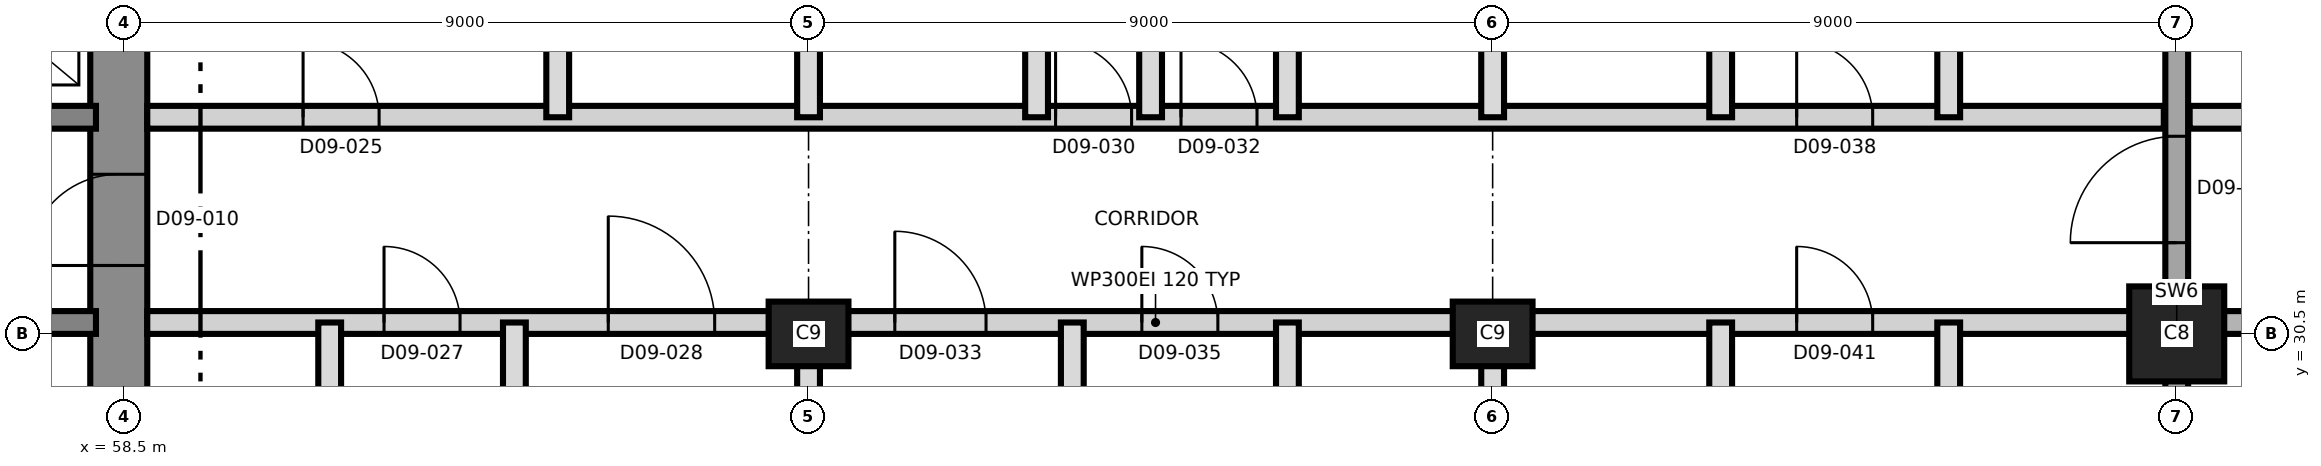
"""IFC4 building model, lengths in metres.
Left out: names, types, materials, properties, quantities, classifications, styles, units other than length and angle.
Written with IfcOpenShell. Run it as: python <this file> out.ifc"""

import sys

from ifc_helpers import new_model, si_unit, direction, frame, frame_2d, origin, origin_2d, place, context, subcontext, project, spatial, rectangle, extrude, element, fill, save


model = new_model("IFC4")
c1 = context("Model", 3, precision=1e-05, world=origin(), true_north=direction((0.0, 1.0)))
c2 = subcontext(c1, "Body", "Model", "MODEL_VIEW")
j1 = project(units=[si_unit("LENGTHUNIT", "METRE"), si_unit("PLANEANGLEUNIT", "RADIAN")], contexts=[c1])
p1 = place(None, origin())
s1 = spatial("IfcSite", under=j1, at=p1, CompositionType="ELEMENT")
p2 = place(p1, origin())
s2 = spatial("IfcBuilding", under=s1, at=p2, CompositionType="ELEMENT")
p3 = place(p2, frame((0.0, 0.0, 109.3)))
s3 = spatial("IfcBuildingStorey", under=s2, at=p3, CompositionType="ELEMENT", Elevation=109.3)
p4 = place(p3, frame((58.425, 21.125, 0.0), z_axis=(0.0, 0.0, 1.0), x_axis=(0.0, 1.0, 0.0)))
e1 = element("IfcWall", 1, at=p4, inside=s3, PredefinedType="SHEAR", context=c2, shape_type="SweptSolid", body=[
    extrude(rectangle(XDim=18.75, YDim=0.75, at=frame_2d((9.375, 0.0))), origin(), (0.0, 0.0, 1.0), 3.7),
])
p5 = place(p4, frame((10.275, 0.0, 0.0)))
e2 = element("IfcOpeningElement", 2, at=p5, cuts=e1, PredefinedType="OPENING", context=c2, shape_type="SweptSolid", body=[
    extrude(rectangle(XDim=1.2, YDim=2.1, at=frame_2d((0.6, 1.05))), frame((0.0, 0.385, 0.0), z_axis=(0.0, -1.0, 0.0), x_axis=(1.0, 0.0, 0.0)), (0.0, 0.0, 1.0), 0.77),
])
p6 = place(p3, frame((31.875, 30.65, 0.0), z_axis=(0.0, 0.0, 1.0), x_axis=(1.0, 0.0, 0.0)))
e3 = element("IfcWall", 3, at=p6, inside=s3, PredefinedType="SHEAR", context=c2, shape_type="SweptSolid", body=[
    extrude(rectangle(XDim=26.25, YDim=0.3, at=frame_2d((13.125, 0.0))), origin(), (0.0, 0.0, 1.0), 3.7),
])
p7 = place(p6, frame((24.625, 0.0, 0.0)))
e4 = element("IfcOpeningElement", 4, at=p7, cuts=e3, PredefinedType="OPENING", context=c2, shape_type="SweptSolid", body=[
    extrude(rectangle(XDim=1.0, YDim=2.1, at=frame_2d((0.5, 1.05))), frame((0.0, 0.16, 0.0), z_axis=(0.0, -1.0, 0.0), x_axis=(1.0, 0.0, 0.0)), (0.0, 0.0, 1.0), 0.32),
])
p8 = place(p6, frame((11.425, 0.0, 0.0)))
e5 = element("IfcOpeningElement", 5, at=p8, cuts=e3, PredefinedType="OPENING", context=c2, shape_type="SweptSolid", body=[
    extrude(rectangle(XDim=1.0, YDim=2.1, at=frame_2d((0.5, 1.05))), frame((0.0, 0.16, 0.0), z_axis=(0.0, -1.0, 0.0), x_axis=(1.0, 0.0, 0.0)), (0.0, 0.0, 1.0), 0.32),
])
p9 = place(p3, frame((31.875, 33.35, 0.0), z_axis=(0.0, 0.0, 1.0), x_axis=(1.0, 0.0, 0.0)))
e6 = element("IfcWall", 6, at=p9, inside=s3, PredefinedType="SHEAR", context=c2, shape_type="SweptSolid", body=[
    extrude(rectangle(XDim=26.25, YDim=0.3, at=frame_2d((13.125, 0.0))), origin(), (0.0, 0.0, 1.0), 3.7),
])
p10 = place(p9, frame((13.775, 0.0, 0.0)))
e7 = element("IfcOpeningElement", 7, at=p10, cuts=e6, PredefinedType="OPENING", context=c2, shape_type="SweptSolid", body=[
    extrude(rectangle(XDim=1.4, YDim=2.1, at=frame_2d((0.7, 1.05))), frame((0.0, 0.16, 0.0), z_axis=(0.0, -1.0, 0.0), x_axis=(1.0, 0.0, 0.0)), (0.0, 0.0, 1.0), 0.32),
])
p11 = place(p9, frame((5.25, 0.0, 0.0)))
e8 = element("IfcOpeningElement", 8, at=p11, cuts=e6, PredefinedType="OPENING", context=c2, shape_type="SweptSolid", body=[
    extrude(rectangle(XDim=1.2, YDim=2.1, at=frame_2d((0.6, 1.05))), frame((0.0, 0.16, 0.0), z_axis=(0.0, -1.0, 0.0), x_axis=(1.0, 0.0, 0.0)), (0.0, 0.0, 1.0), 0.32),
])
p12 = place(p9, frame((19.8, 0.0, 0.0)))
e9 = element("IfcOpeningElement", 9, at=p12, cuts=e6, PredefinedType="OPENING", context=c2, shape_type="SweptSolid", body=[
    extrude(rectangle(XDim=1.2, YDim=2.1, at=frame_2d((0.6, 1.05))), frame((0.0, 0.16, 0.0), z_axis=(0.0, -1.0, 0.0), x_axis=(1.0, 0.0, 0.0)), (0.0, 0.0, 1.0), 0.32),
])
for number, where, z_axis, x_axis in (
    (10, (67.5, 30.5, 0.0), (0.0, 0.0, 1.0), (1.0, 0.0, 0.0)),
    (11, (76.5, 30.5, 0.0), (0.0, 0.0, 1.0), (1.0, 0.0, 0.0)),
):
    element("IfcColumn", number, at=place(p3, frame(where, z_axis=z_axis, x_axis=x_axis)), inside=s3, PredefinedType="COLUMN", context=c2, shape_type="SweptSolid", body=[
        extrude(rectangle(XDim=1.05, YDim=0.85, at=origin_2d()), origin(), (0.0, 0.0, 1.0), 3.7),
    ])
p13 = place(p3, frame((85.5, 30.5, 0.0), z_axis=(0.0, 0.0, 1.0), x_axis=(1.0, 0.0, 0.0)))
e12 = element("IfcColumn", 12, at=p13, inside=s3, PredefinedType="COLUMN", context=c2, shape_type="SweptSolid", body=[
    extrude(rectangle(XDim=1.25, YDim=1.25, at=origin_2d()), origin(), (0.0, 0.0, 1.0), 3.7),
])
p14 = place(p3, frame((85.5, 20.35, 0.0), z_axis=(0.0, 0.0, 1.0), x_axis=(0.0, 1.0, 0.0)))
e13 = element("IfcWall", 13, at=p14, inside=s3, PredefinedType="SHEAR", context=c2, shape_type="SweptSolid", body=[
    extrude(rectangle(XDim=20.3, YDim=0.3, at=frame_2d((10.15, 0.0))), origin(), (0.0, 0.0, 1.0), 3.7),
])
p15 = place(p14, frame((11.35, 0.0, 0.0)))
e14 = element("IfcOpeningElement", 14, at=p15, cuts=e13, PredefinedType="OPENING", context=c2, shape_type="SweptSolid", body=[
    extrude(rectangle(XDim=1.4, YDim=2.1, at=frame_2d((0.7, 1.05))), frame((0.0, 0.16, 0.0), z_axis=(0.0, -1.0, 0.0), x_axis=(1.0, 0.0, 0.0)), (0.0, 0.0, 1.0), 0.32),
])
p16 = place(p3, frame((58.8, 30.65, 0.0), z_axis=(0.0, 0.0, 1.0), x_axis=(1.0, 0.0, 0.0)))
e15 = element("IfcWall", 15, at=p16, inside=s3, PredefinedType="PARTITIONING", context=c2, shape_type="SweptSolid", body=[
    extrude(rectangle(XDim=26.53, YDim=0.3, at=frame_2d((13.265, 0.0))), origin(), (0.0, 0.0, 1.0), 3.4),
])
p17 = place(p16, frame((3.115, 0.0, 0.0)))
e16 = element("IfcOpeningElement", 16, at=p17, cuts=e15, PredefinedType="OPENING", context=c2, shape_type="SweptSolid", body=[
    extrude(rectangle(XDim=1.0, YDim=2.1, at=frame_2d((0.5, 1.05))), frame((0.0, 0.16, 0.0), z_axis=(0.0, -1.0, 0.0), x_axis=(1.0, 0.0, 0.0)), (0.0, 0.0, 1.0), 0.32),
])
p18 = place(p16, frame((6.065, 0.0, 0.0)))
e17 = element("IfcOpeningElement", 17, at=p18, cuts=e15, PredefinedType="OPENING", context=c2, shape_type="SweptSolid", body=[
    extrude(rectangle(XDim=1.4, YDim=2.1, at=frame_2d((0.7, 1.05))), frame((0.0, 0.16, 0.0), z_axis=(0.0, -1.0, 0.0), x_axis=(1.0, 0.0, 0.0)), (0.0, 0.0, 1.0), 0.32),
])
p19 = place(p16, frame((9.835, 0.0, 0.0)))
e18 = element("IfcOpeningElement", 18, at=p19, cuts=e15, PredefinedType="OPENING", context=c2, shape_type="SweptSolid", body=[
    extrude(rectangle(XDim=1.2, YDim=2.1, at=frame_2d((0.6, 1.05))), frame((0.0, 0.16, 0.0), z_axis=(0.0, -1.0, 0.0), x_axis=(1.0, 0.0, 0.0)), (0.0, 0.0, 1.0), 0.32),
])
p20 = place(p16, frame((13.085, 0.0, 0.0)))
e19 = element("IfcOpeningElement", 19, at=p20, cuts=e15, PredefinedType="OPENING", context=c2, shape_type="SweptSolid", body=[
    extrude(rectangle(XDim=1.0, YDim=2.1, at=frame_2d((0.5, 1.05))), frame((0.0, 0.16, 0.0), z_axis=(0.0, -1.0, 0.0), x_axis=(1.0, 0.0, 0.0)), (0.0, 0.0, 1.0), 0.32),
])
p21 = place(p16, frame((21.7, 0.0, 0.0)))
e20 = element("IfcOpeningElement", 20, at=p21, cuts=e15, PredefinedType="OPENING", context=c2, shape_type="SweptSolid", body=[
    extrude(rectangle(XDim=1.0, YDim=2.4, at=frame_2d((0.5, 1.2))), frame((0.0, 0.16, 0.0), z_axis=(0.0, -1.0, 0.0), x_axis=(1.0, 0.0, 0.0)), (0.0, 0.0, 1.0), 0.32),
])
p22 = place(p3, frame((85.67, 30.65, 0.0), z_axis=(0.0, 0.0, 1.0), x_axis=(1.0, 0.0, 0.0)))
e21 = element("IfcWall", 21, at=p22, inside=s3, PredefinedType="SHEAR", context=c2, shape_type="SweptSolid", body=[
    extrude(rectangle(XDim=9.58, YDim=0.3, at=frame_2d((4.79, 0.0))), origin(), (0.0, 0.0, 1.0), 3.4),
])
p23 = place(p22, frame((2.08, 0.0, 0.0)))
e22 = element("IfcOpeningElement", 22, at=p23, cuts=e21, PredefinedType="OPENING", context=c2, shape_type="SweptSolid", body=[
    extrude(rectangle(XDim=1.2, YDim=2.1, at=frame_2d((0.6, 1.05))), frame((0.0, 0.16, 0.0), z_axis=(0.0, -1.0, 0.0), x_axis=(1.0, 0.0, 0.0)), (0.0, 0.0, 1.0), 0.32),
])
p24 = place(p22, frame((5.63, 0.0, 0.0)))
e23 = element("IfcOpeningElement", 23, at=p24, cuts=e21, PredefinedType="OPENING", context=c2, shape_type="SweptSolid", body=[
    extrude(rectangle(XDim=1.0, YDim=2.1, at=frame_2d((0.5, 1.05))), frame((0.0, 0.16, 0.0), z_axis=(0.0, -1.0, 0.0), x_axis=(1.0, 0.0, 0.0)), (0.0, 0.0, 1.0), 0.32),
])
p25 = place(p3, frame((58.8, 33.35, 0.0), z_axis=(0.0, 0.0, 1.0), x_axis=(1.0, 0.0, 0.0)))
e24 = element("IfcWall", 24, at=p25, inside=s3, PredefinedType="PARTITIONING", context=c2, shape_type="SweptSolid", body=[
    extrude(rectangle(XDim=26.53, YDim=0.3, at=frame_2d((13.265, 0.0))), origin(), (0.0, 0.0, 1.0), 3.4),
])
p26 = place(p25, frame((2.05, 0.0, 0.0)))
e25 = element("IfcOpeningElement", 25, at=p26, cuts=e24, PredefinedType="OPENING", context=c2, shape_type="SweptSolid", body=[
    extrude(rectangle(XDim=1.0, YDim=2.4, at=frame_2d((0.5, 1.2))), frame((0.0, 0.16, 0.0), z_axis=(0.0, -1.0, 0.0), x_axis=(1.0, 0.0, 0.0)), (0.0, 0.0, 1.0), 0.32),
])
p27 = place(p25, frame((11.95, 0.0, 0.0)))
e26 = element("IfcOpeningElement", 26, at=p27, cuts=e24, PredefinedType="OPENING", context=c2, shape_type="SweptSolid", body=[
    extrude(rectangle(XDim=1.0, YDim=2.1, at=frame_2d((0.5, 1.05))), frame((0.0, 0.16, 0.0), z_axis=(0.0, -1.0, 0.0), x_axis=(1.0, 0.0, 0.0)), (0.0, 0.0, 1.0), 0.32),
])
p28 = place(p25, frame((13.6, 0.0, 0.0)))
e27 = element("IfcOpeningElement", 27, at=p28, cuts=e24, PredefinedType="OPENING", context=c2, shape_type="SweptSolid", body=[
    extrude(rectangle(XDim=1.0, YDim=2.1, at=frame_2d((0.5, 1.05))), frame((0.0, 0.16, 0.0), z_axis=(0.0, -1.0, 0.0), x_axis=(1.0, 0.0, 0.0)), (0.0, 0.0, 1.0), 0.32),
])
p29 = place(p25, frame((21.7, 0.0, 0.0)))
e28 = element("IfcOpeningElement", 28, at=p29, cuts=e24, PredefinedType="OPENING", context=c2, shape_type="SweptSolid", body=[
    extrude(rectangle(XDim=1.0, YDim=2.4, at=frame_2d((0.5, 1.2))), frame((0.0, 0.16, 0.0), z_axis=(0.0, -1.0, 0.0), x_axis=(1.0, 0.0, 0.0)), (0.0, 0.0, 1.0), 0.32),
])
p30 = place(p3, frame((85.67, 33.35, 0.0), z_axis=(0.0, 0.0, 1.0), x_axis=(1.0, 0.0, 0.0)))
e29 = element("IfcWall", 29, at=p30, inside=s3, PredefinedType="PARTITIONING", context=c2, shape_type="SweptSolid", body=[
    extrude(rectangle(XDim=9.58, YDim=0.3, at=frame_2d((4.79, 0.0))), origin(), (0.0, 0.0, 1.0), 3.4),
])
p31 = place(p30, frame((1.83, 0.0, 0.0)))
e30 = element("IfcOpeningElement", 30, at=p31, cuts=e29, PredefinedType="OPENING", context=c2, shape_type="SweptSolid", body=[
    extrude(rectangle(XDim=1.0, YDim=2.1, at=frame_2d((0.5, 1.05))), frame((0.0, 0.16, 0.0), z_axis=(0.0, -1.0, 0.0), x_axis=(1.0, 0.0, 0.0)), (0.0, 0.0, 1.0), 0.32),
])
p32 = place(p30, frame((5.63, 0.0, 0.0)))
e31 = element("IfcOpeningElement", 31, at=p32, cuts=e29, PredefinedType="OPENING", context=c2, shape_type="SweptSolid", body=[
    extrude(rectangle(XDim=1.0, YDim=2.1, at=frame_2d((0.5, 1.05))), frame((0.0, 0.16, 0.0), z_axis=(0.0, -1.0, 0.0), x_axis=(1.0, 0.0, 0.0)), (0.0, 0.0, 1.0), 0.32),
])
p33 = place(p3, frame((61.2, 27.45, 0.0), z_axis=(0.0, 0.0, 1.0), x_axis=(0.0, 1.0, 0.0)))
e32 = element("IfcWall", 32, at=p33, inside=s3, PredefinedType="PARTITIONING", context=c2, shape_type="SweptSolid", body=[
    extrude(rectangle(XDim=3.2, YDim=0.3, at=frame_2d((1.6, 0.0))), origin(), (0.0, 0.0, 1.0), 3.4),
])
p34 = place(p3, frame((63.63, 20.35, 0.0), z_axis=(0.0, 0.0, 1.0), x_axis=(0.0, 1.0, 0.0)))
e33 = element("IfcWall", 33, at=p34, inside=s3, PredefinedType="PARTITIONING", context=c2, shape_type="SweptSolid", body=[
    extrude(rectangle(XDim=10.3, YDim=0.3, at=frame_2d((5.15, 0.0))), origin(), (0.0, 0.0, 1.0), 3.4),
])
p35 = place(p3, frame((64.2, 33.35, 0.0), z_axis=(0.0, 0.0, 1.0), x_axis=(0.0, 1.0, 0.0)))
e34 = element("IfcWall", 34, at=p35, inside=s3, PredefinedType="PARTITIONING", context=c2, shape_type="SweptSolid", body=[
    extrude(rectangle(XDim=3.5, YDim=0.3, at=frame_2d((1.75, 0.0))), origin(), (0.0, 0.0, 1.0), 3.4),
])
p36 = place(p3, frame((67.5, 20.35, 0.0), z_axis=(0.0, 0.0, 1.0), x_axis=(0.0, 1.0, 0.0)))
e35 = element("IfcWall", 35, at=p36, inside=s3, PredefinedType="PARTITIONING", context=c2, shape_type="SweptSolid", body=[
    extrude(rectangle(XDim=10.3, YDim=0.3, at=frame_2d((5.15, 0.0))), origin(), (0.0, 0.0, 1.0), 3.4),
])
p37 = place(p3, frame((67.5, 33.35, 0.0), z_axis=(0.0, 0.0, 1.0), x_axis=(0.0, 1.0, 0.0)))
e36 = element("IfcWall", 36, at=p37, inside=s3, PredefinedType="PARTITIONING", context=c2, shape_type="SweptSolid", body=[
    extrude(rectangle(XDim=7.48, YDim=0.3, at=frame_2d((3.74, 0.0))), origin(), (0.0, 0.0, 1.0), 3.4),
])
p38 = place(p3, frame((70.5, 33.35, 0.0), z_axis=(0.0, 0.0, 1.0), x_axis=(0.0, 1.0, 0.0)))
e37 = element("IfcWall", 37, at=p38, inside=s3, PredefinedType="PARTITIONING", context=c2, shape_type="SweptSolid", body=[
    extrude(rectangle(XDim=3.3, YDim=0.3, at=frame_2d((1.65, 0.0))), origin(), (0.0, 0.0, 1.0), 3.4),
])
p39 = place(p3, frame((70.97, 20.35, 0.0), z_axis=(0.0, 0.0, 1.0), x_axis=(0.0, 1.0, 0.0)))
e38 = element("IfcWall", 38, at=p39, inside=s3, PredefinedType="PARTITIONING", context=c2, shape_type="SweptSolid", body=[
    extrude(rectangle(XDim=10.3, YDim=0.3, at=frame_2d((5.15, 0.0))), origin(), (0.0, 0.0, 1.0), 3.4),
])
p40 = place(p3, frame((72.0, 33.35, 0.0), z_axis=(0.0, 0.0, 1.0), x_axis=(0.0, 1.0, 0.0)))
e39 = element("IfcWall", 39, at=p40, inside=s3, PredefinedType="PARTITIONING", context=c2, shape_type="SweptSolid", body=[
    extrude(rectangle(XDim=7.48, YDim=0.3, at=frame_2d((3.74, 0.0))), origin(), (0.0, 0.0, 1.0), 3.4),
])
for number, where, z_axis, x_axis in (
    (40, (73.8, 27.45, 0.0), (0.0, 0.0, 1.0), (0.0, 1.0, 0.0)),
    (41, (73.8, 33.35, 0.0), (0.0, 0.0, 1.0), (0.0, 1.0, 0.0)),
):
    element("IfcWall", number, at=place(p3, frame(where, z_axis=z_axis, x_axis=x_axis)), inside=s3, PredefinedType="PARTITIONING", context=c2, shape_type="SweptSolid", body=[
        extrude(rectangle(XDim=3.2, YDim=0.3, at=frame_2d((1.6, 0.0))), origin(), (0.0, 0.0, 1.0), 3.4),
    ])
p41 = place(p3, frame((76.5, 20.35, 0.0), z_axis=(0.0, 0.0, 1.0), x_axis=(0.0, 1.0, 0.0)))
e42 = element("IfcWall", 42, at=p41, inside=s3, PredefinedType="PARTITIONING", context=c2, shape_type="SweptSolid", body=[
    extrude(rectangle(XDim=10.3, YDim=0.3, at=frame_2d((5.15, 0.0))), origin(), (0.0, 0.0, 1.0), 3.4),
])
p42 = place(p3, frame((76.5, 33.35, 0.0), z_axis=(0.0, 0.0, 1.0), x_axis=(0.0, 1.0, 0.0)))
e43 = element("IfcWall", 43, at=p42, inside=s3, PredefinedType="PARTITIONING", context=c2, shape_type="SweptSolid", body=[
    extrude(rectangle(XDim=7.48, YDim=0.3, at=frame_2d((3.74, 0.0))), origin(), (0.0, 0.0, 1.0), 3.4),
])
for number, where, z_axis, x_axis in (
    (44, (79.5, 27.35, 0.0), (0.0, 0.0, 1.0), (0.0, 1.0, 0.0)),
    (45, (79.5, 33.35, 0.0), (0.0, 0.0, 1.0), (0.0, 1.0, 0.0)),
    (46, (82.5, 27.35, 0.0), (0.0, 0.0, 1.0), (0.0, 1.0, 0.0)),
    (47, (82.5, 33.35, 0.0), (0.0, 0.0, 1.0), (0.0, 1.0, 0.0)),
):
    element("IfcWall", number, at=place(p3, frame(where, z_axis=z_axis, x_axis=x_axis)), inside=s3, PredefinedType="PARTITIONING", context=c2, shape_type="SweptSolid", body=[
        extrude(rectangle(XDim=3.3, YDim=0.3, at=frame_2d((1.65, 0.0))), origin(), (0.0, 0.0, 1.0), 3.4),
    ])
p43 = place(p5, origin())
e48 = element("IfcDoor", 48, at=p43, inside=s3, OperationType="SINGLE_SWING_LEFT", PredefinedType="DOOR", context=c2, shape_type="SweptSolid", body=[
    extrude(rectangle(XDim=1.2, YDim=2.1, at=frame_2d((0.6, 1.05))), frame((0.0, 0.025, 0.0), z_axis=(0.0, -1.0, 0.0), x_axis=(1.0, 0.0, 0.0)), (0.0, 0.0, 1.0), 0.05),
])
fill(e2, e48)
p44 = place(p26, origin())
e49 = element("IfcDoor", 49, at=p44, inside=s3, OperationType="SINGLE_SWING_LEFT", PredefinedType="DOOR", context=c2, shape_type="SweptSolid", body=[
    extrude(rectangle(XDim=1.0, YDim=2.4, at=frame_2d((0.5, 1.2))), frame((0.0, 0.025, 0.0), z_axis=(0.0, -1.0, 0.0), x_axis=(1.0, 0.0, 0.0)), (0.0, 0.0, 1.0), 0.05),
])
fill(e25, e49)
p45 = place(p17, origin())
e50 = element("IfcDoor", 50, at=p45, inside=s3, OperationType="SINGLE_SWING_RIGHT", PredefinedType="DOOR", context=c2, shape_type="SweptSolid", body=[
    extrude(rectangle(XDim=1.0, YDim=2.1, at=frame_2d((0.5, 1.05))), frame((0.0, 0.025, 0.0), z_axis=(0.0, -1.0, 0.0), x_axis=(1.0, 0.0, 0.0)), (0.0, 0.0, 1.0), 0.05),
])
fill(e16, e50)
p46 = place(p18, origin())
e51 = element("IfcDoor", 51, at=p46, inside=s3, OperationType="SINGLE_SWING_LEFT", PredefinedType="DOOR", context=c2, shape_type="SweptSolid", body=[
    extrude(rectangle(XDim=1.4, YDim=2.1, at=frame_2d((0.7, 1.05))), frame((0.0, 0.025, 0.0), z_axis=(0.0, -1.0, 0.0), x_axis=(1.0, 0.0, 0.0)), (0.0, 0.0, 1.0), 0.05),
])
fill(e17, e51)
p47 = place(p27, origin())
e52 = element("IfcDoor", 52, at=p47, inside=s3, OperationType="SINGLE_SWING_RIGHT", PredefinedType="DOOR", context=c2, shape_type="SweptSolid", body=[
    extrude(rectangle(XDim=1.0, YDim=2.1, at=frame_2d((0.5, 1.05))), frame((0.0, 0.025, 0.0), z_axis=(0.0, -1.0, 0.0), x_axis=(1.0, 0.0, 0.0)), (0.0, 0.0, 1.0), 0.05),
])
fill(e26, e52)
p48 = place(p28, origin())
e53 = element("IfcDoor", 53, at=p48, inside=s3, OperationType="SINGLE_SWING_LEFT", PredefinedType="DOOR", context=c2, shape_type="SweptSolid", body=[
    extrude(rectangle(XDim=1.0, YDim=2.1, at=frame_2d((0.5, 1.05))), frame((0.0, 0.025, 0.0), z_axis=(0.0, -1.0, 0.0), x_axis=(1.0, 0.0, 0.0)), (0.0, 0.0, 1.0), 0.05),
])
fill(e27, e53)
p49 = place(p19, origin())
e54 = element("IfcDoor", 54, at=p49, inside=s3, OperationType="SINGLE_SWING_LEFT", PredefinedType="DOOR", context=c2, shape_type="SweptSolid", body=[
    extrude(rectangle(XDim=1.2, YDim=2.1, at=frame_2d((0.6, 1.05))), frame((0.0, 0.025, 0.0), z_axis=(0.0, -1.0, 0.0), x_axis=(1.0, 0.0, 0.0)), (0.0, 0.0, 1.0), 0.05),
])
fill(e18, e54)
p50 = place(p20, origin())
e55 = element("IfcDoor", 55, at=p50, inside=s3, OperationType="SINGLE_SWING_LEFT", PredefinedType="DOOR", context=c2, shape_type="SweptSolid", body=[
    extrude(rectangle(XDim=1.0, YDim=2.1, at=frame_2d((0.5, 1.05))), frame((0.0, 0.025, 0.0), z_axis=(0.0, -1.0, 0.0), x_axis=(1.0, 0.0, 0.0)), (0.0, 0.0, 1.0), 0.05),
])
fill(e19, e55)
p51 = place(p29, origin())
e56 = element("IfcDoor", 56, at=p51, inside=s3, OperationType="SINGLE_SWING_LEFT", PredefinedType="DOOR", context=c2, shape_type="SweptSolid", body=[
    extrude(rectangle(XDim=1.0, YDim=2.4, at=frame_2d((0.5, 1.2))), frame((0.0, 0.025, 0.0), z_axis=(0.0, -1.0, 0.0), x_axis=(1.0, 0.0, 0.0)), (0.0, 0.0, 1.0), 0.05),
])
fill(e28, e56)
p52 = place(p21, origin())
e57 = element("IfcDoor", 57, at=p52, inside=s3, OperationType="SINGLE_SWING_LEFT", PredefinedType="DOOR", context=c2, shape_type="SweptSolid", body=[
    extrude(rectangle(XDim=1.0, YDim=2.4, at=frame_2d((0.5, 1.2))), frame((0.0, 0.025, 0.0), z_axis=(0.0, -1.0, 0.0), x_axis=(1.0, 0.0, 0.0)), (0.0, 0.0, 1.0), 0.05),
])
fill(e20, e57)
p53 = place(p15, origin())
e58 = element("IfcDoor", 58, at=p53, inside=s3, OperationType="SINGLE_SWING_RIGHT", PredefinedType="DOOR", context=c2, shape_type="SweptSolid", body=[
    extrude(rectangle(XDim=1.4, YDim=2.1, at=frame_2d((0.7, 1.05))), frame((0.0, 0.025, 0.0), z_axis=(0.0, -1.0, 0.0), x_axis=(1.0, 0.0, 0.0)), (0.0, 0.0, 1.0), 0.05),
])
fill(e14, e58)
save(model, sys.argv[1])
